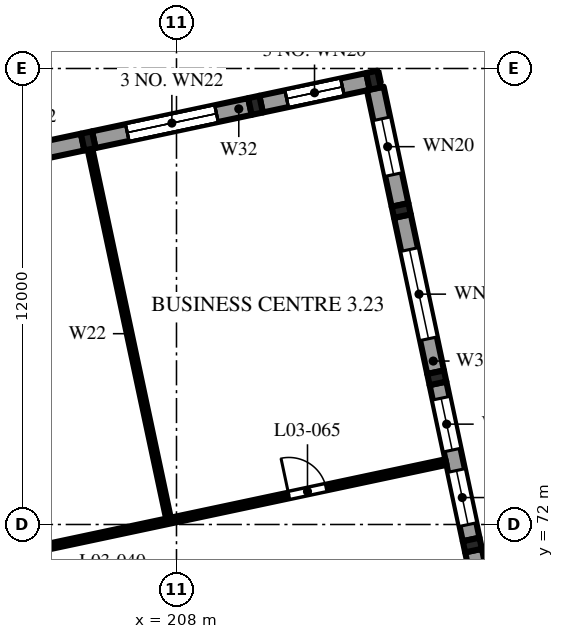
"""IFC4 building model, lengths in metres.
Left out: names, types, materials, properties, quantities, classifications, styles, units other than length and angle.
Written with IfcOpenShell. Run it as: python <this file> out.ifc"""

import sys

from ifc_helpers import new_model, si_unit, direction, frame, frame_2d, origin, origin_2d, place, context, subcontext, project, spatial, polyline, rectangle, i_section, outline, extrude, element, fill, save


model = new_model("IFC4")
c1 = context("Model", 3, precision=1e-05, world=origin(), true_north=direction((0.0, 1.0)))
c2 = subcontext(c1, "Body", "Model", "MODEL_VIEW")
j1 = project(units=[si_unit("LENGTHUNIT", "METRE"), si_unit("PLANEANGLEUNIT", "RADIAN")], contexts=[c1])
p1 = place(None, origin())
s1 = spatial("IfcSite", under=j1, at=p1, CompositionType="ELEMENT")
p2 = place(p1, origin())
s2 = spatial("IfcBuilding", under=s1, at=p2, CompositionType="ELEMENT")
p3 = place(p2, frame((0.0, 0.0, 16.8)))
s3 = spatial("IfcBuildingStorey", under=s2, at=p3, CompositionType="ELEMENT", Elevation=16.8)
for number, where, z_axis, x_axis in (
    (1, (205.678, 82.095, 0.0), (0.0, 0.0, 1.0), (0.978, 0.208, 0.0)),
    (2, (210.079, 83.031, 0.0), (0.0, 0.0, 1.0), (0.978, 0.208, 0.0)),
    (3, (213.185, 83.691, 0.0), (0.0, 0.0, 1.0), (0.978, 0.208, 0.0)),
    (4, (215.785, 71.459, 0.0), (0.0, 0.0, 1.0), (-0.208, 0.978, 0.0)),
    (5, (214.849, 75.861, 0.0), (0.0, 0.0, 1.0), (-0.208, 0.978, 0.0)),
    (6, (213.914, 80.263, 0.0), (0.0, 0.0, 1.0), (-0.208, 0.978, 0.0)),
):
    element("IfcColumn", number, at=place(p3, frame(where, z_axis=z_axis, x_axis=x_axis)), inside=s3, PredefinedType="COLUMN", context=c2, shape_type="SweptSolid", body=[
        extrude(i_section(OverallWidth=0.3, OverallDepth=0.45, WebThickness=0.014, FlangeThickness=0.026, FilletRadius=0.027, at=origin_2d()), origin(), (0.0, 0.0, 1.0), 4.8),
    ])
p4 = place(p3, frame((201.423, 81.191, 0.0), z_axis=(0.0, 0.0, 1.0), x_axis=(0.978155748334, 0.207873355681, 0.0)))
e7 = element("IfcWall", 7, at=p4, inside=s3, PredefinedType="SOLIDWALL", context=c2, shape_type="SweptSolid", body=[
    extrude(outline(polyline([(0.0, 0.0), (4.2, 0.0), (4.2, 15.04), (0.0, 14.816), (0.0, 0.0)])), frame((0.0, 0.225, 0.0), z_axis=(0.0, -1.0, 0.0), x_axis=(1.0, 0.0, 0.0)), (0.0, 0.0, 1.0), 0.45),
])
p5 = place(p4, frame((0.9, 0.0, 0.9)))
e8 = element("IfcOpeningElement", 8, at=p5, cuts=e7, PredefinedType="OPENING", context=c2, shape_type="SweptSolid", body=[
    extrude(rectangle(XDim=2.4, YDim=2.4, at=frame_2d((1.2, 1.2))), frame((0.0, 0.235, 0.0), z_axis=(0.0, -1.0, 0.0), x_axis=(1.0, 0.0, 0.0)), (0.0, 0.0, 1.0), 0.47),
])
p6 = place(p4, frame((0.9, 0.0, 5.1)))
e9 = element("IfcOpeningElement", 9, at=p6, cuts=e7, PredefinedType="OPENING", context=c2, shape_type="SweptSolid", body=[
    extrude(rectangle(XDim=2.4, YDim=2.4, at=frame_2d((1.2, 1.2))), frame((0.0, 0.235, 0.0), z_axis=(0.0, -1.0, 0.0), x_axis=(1.0, 0.0, 0.0)), (0.0, 0.0, 1.0), 0.47),
])
p7 = place(p4, frame((0.9, 0.0, 9.3)))
e10 = element("IfcOpeningElement", 10, at=p7, cuts=e7, PredefinedType="OPENING", context=c2, shape_type="SweptSolid", body=[
    extrude(rectangle(XDim=2.4, YDim=2.4, at=frame_2d((1.2, 1.2))), frame((0.0, 0.235, 0.0), z_axis=(0.0, -1.0, 0.0), x_axis=(1.0, 0.0, 0.0)), (0.0, 0.0, 1.0), 0.47),
])
p8 = place(p3, frame((205.824, 82.126, 0.0), z_axis=(0.0, 0.0, 1.0), x_axis=(0.978143927149, 0.207928972925, 0.0)))
e11 = element("IfcWall", 11, at=p8, inside=s3, PredefinedType="SOLIDWALL", context=c2, shape_type="SweptSolid", body=[
    extrude(outline(polyline([(0.0, 0.0), (4.2, 0.0), (4.2, 15.281), (0.0, 15.056), (0.0, 0.0)])), frame((0.0, 0.225, 0.0), z_axis=(0.0, -1.0, 0.0), x_axis=(1.0, 0.0, 0.0)), (0.0, 0.0, 1.0), 0.45),
])
p9 = place(p8, frame((0.9, 0.0, 0.9)))
e12 = element("IfcOpeningElement", 12, at=p9, cuts=e11, PredefinedType="OPENING", context=c2, shape_type="SweptSolid", body=[
    extrude(rectangle(XDim=2.4, YDim=2.4, at=frame_2d((1.2, 1.2))), frame((0.0, 0.235, 0.0), z_axis=(0.0, -1.0, 0.0), x_axis=(1.0, 0.0, 0.0)), (0.0, 0.0, 1.0), 0.47),
])
p10 = place(p8, frame((0.9, 0.0, 5.1)))
e13 = element("IfcOpeningElement", 13, at=p10, cuts=e11, PredefinedType="OPENING", context=c2, shape_type="SweptSolid", body=[
    extrude(rectangle(XDim=2.4, YDim=2.4, at=frame_2d((1.2, 1.2))), frame((0.0, 0.235, 0.0), z_axis=(0.0, -1.0, 0.0), x_axis=(1.0, 0.0, 0.0)), (0.0, 0.0, 1.0), 0.47),
])
p11 = place(p8, frame((0.9, 0.0, 9.3)))
e14 = element("IfcOpeningElement", 14, at=p11, cuts=e11, PredefinedType="OPENING", context=c2, shape_type="SweptSolid", body=[
    extrude(rectangle(XDim=2.4, YDim=2.4, at=frame_2d((1.2, 1.2))), frame((0.0, 0.235, 0.0), z_axis=(0.0, -1.0, 0.0), x_axis=(1.0, 0.0, 0.0)), (0.0, 0.0, 1.0), 0.47),
])
p12 = place(p3, frame((210.226, 83.062, 0.0), z_axis=(0.0, 0.0, 1.0), x_axis=(0.978137912316, 0.207957266018, 0.0)))
e15 = element("IfcWall", 15, at=p12, inside=s3, PredefinedType="SOLIDWALL", context=c2, shape_type="SweptSolid", body=[
    extrude(outline(polyline([(0.0, 0.0), (2.875, 0.0), (2.875, 15.451), (0.0, 15.297), (0.0, 0.0)])), frame((0.0, 0.225, 0.0), z_axis=(0.0, -1.0, 0.0), x_axis=(1.0, 0.0, 0.0)), (0.0, 0.0, 1.0), 0.45),
])
p13 = place(p12, frame((0.688, 0.0, 0.9)))
e16 = element("IfcOpeningElement", 16, at=p13, cuts=e15, PredefinedType="OPENING", context=c2, shape_type="SweptSolid", body=[
    extrude(rectangle(XDim=1.5, YDim=2.4, at=frame_2d((0.75, 1.2))), frame((0.0, 0.235, 0.0), z_axis=(0.0, -1.0, 0.0), x_axis=(1.0, 0.0, 0.0)), (0.0, 0.0, 1.0), 0.47),
])
p14 = place(p12, frame((0.688, 0.0, 5.1)))
e17 = element("IfcOpeningElement", 17, at=p14, cuts=e15, PredefinedType="OPENING", context=c2, shape_type="SweptSolid", body=[
    extrude(rectangle(XDim=1.5, YDim=2.4, at=frame_2d((0.75, 1.2))), frame((0.0, 0.235, 0.0), z_axis=(0.0, -1.0, 0.0), x_axis=(1.0, 0.0, 0.0)), (0.0, 0.0, 1.0), 0.47),
])
p15 = place(p12, frame((0.688, 0.0, 9.3)))
e18 = element("IfcOpeningElement", 18, at=p15, cuts=e15, PredefinedType="OPENING", context=c2, shape_type="SweptSolid", body=[
    extrude(rectangle(XDim=1.5, YDim=2.4, at=frame_2d((0.75, 1.2))), frame((0.0, 0.235, 0.0), z_axis=(0.0, -1.0, 0.0), x_axis=(1.0, 0.0, 0.0)), (0.0, 0.0, 1.0), 0.47),
])
p16 = place(p3, frame((216.689, 67.204, 0.0), z_axis=(0.0, 0.0, 1.0), x_axis=(-0.207873355681, 0.978155748334, 0.0)))
e19 = element("IfcWall", 19, at=p16, inside=s3, PredefinedType="SOLIDWALL", context=c2, shape_type="SweptSolid", body=[
    extrude(outline(polyline([(0.0, 0.0), (4.2, 0.0), (4.2, 16.122), (0.0, 16.342), (0.0, 0.0)])), frame((0.0, 0.225, 0.0), z_axis=(0.0, -1.0, 0.0), x_axis=(1.0, 0.0, 0.0)), (0.0, 0.0, 1.0), 0.45),
])
p17 = place(p16, frame((0.4, 0.0, 0.9)))
e20 = element("IfcOpeningElement", 20, at=p17, cuts=e19, PredefinedType="OPENING", context=c2, shape_type="SweptSolid", body=[
    extrude(rectangle(XDim=2.405, YDim=2.4, at=frame_2d((1.203, 1.2))), frame((0.0, 0.235, 0.0), z_axis=(0.0, -1.0, 0.0), x_axis=(1.0, 0.0, 0.0)), (0.0, 0.0, 1.0), 0.47),
])
p18 = place(p16, frame((3.355, 0.0, 0.9)))
e21 = element("IfcOpeningElement", 21, at=p18, cuts=e19, PredefinedType="OPENING", context=c2, shape_type="SweptSolid", body=[
    extrude(rectangle(XDim=0.445, YDim=2.4, at=frame_2d((0.223, 1.2))), frame((0.0, 0.235, 0.0), z_axis=(0.0, -1.0, 0.0), x_axis=(1.0, 0.0, 0.0)), (0.0, 0.0, 1.0), 0.47),
])
p19 = place(p3, frame((215.754, 71.606, 0.0), z_axis=(0.0, 0.0, 1.0), x_axis=(-0.207873355681, 0.978155748334, 0.0)))
e22 = element("IfcWall", 22, at=p19, inside=s3, PredefinedType="SOLIDWALL", context=c2, shape_type="SweptSolid", body=[
    extrude(outline(polyline([(0.0, 0.0), (4.2, 0.0), (4.2, 15.886), (0.0, 16.106), (0.0, 0.0)])), frame((0.0, 0.225, 0.0), z_axis=(0.0, -1.0, 0.0), x_axis=(1.0, 0.0, 0.0)), (0.0, 0.0, 1.0), 0.45),
])
p20 = place(p19, frame((0.4, 0.0, 0.9)))
e23 = element("IfcOpeningElement", 23, at=p20, cuts=e22, PredefinedType="OPENING", context=c2, shape_type="SweptSolid", body=[
    extrude(rectangle(XDim=1.455, YDim=2.4, at=frame_2d((0.728, 1.2))), frame((0.0, 0.235, 0.0), z_axis=(0.0, -1.0, 0.0), x_axis=(1.0, 0.0, 0.0)), (0.0, 0.0, 1.0), 0.47),
])
p21 = place(p19, frame((2.405, 0.0, 0.9)))
e24 = element("IfcOpeningElement", 24, at=p21, cuts=e22, PredefinedType="OPENING", context=c2, shape_type="SweptSolid", body=[
    extrude(rectangle(XDim=1.395, YDim=2.4, at=frame_2d((0.698, 1.2))), frame((0.0, 0.235, 0.0), z_axis=(0.0, -1.0, 0.0), x_axis=(1.0, 0.0, 0.0)), (0.0, 0.0, 1.0), 0.47),
])
p22 = place(p3, frame((214.818, 76.008, 0.0), z_axis=(0.0, 0.0, 1.0), x_axis=(-0.207917150959, 0.978146440129, 0.0)))
e25 = element("IfcWall", 25, at=p22, inside=s3, PredefinedType="SOLIDWALL", context=c2, shape_type="SweptSolid", body=[
    extrude(outline(polyline([(0.0, 0.0), (4.2, 0.0), (4.2, 15.651), (0.0, 15.871), (0.0, 0.0)])), frame((0.0, 0.225, 0.0), z_axis=(0.0, -1.0, 0.0), x_axis=(1.0, 0.0, 0.0)), (0.0, 0.0, 1.0), 0.45),
])
p23 = place(p22, frame((0.9, 0.0, 0.9)))
e26 = element("IfcOpeningElement", 26, at=p23, cuts=e25, PredefinedType="OPENING", context=c2, shape_type="SweptSolid", body=[
    extrude(rectangle(XDim=2.4, YDim=2.4, at=frame_2d((1.2, 1.2))), frame((0.0, 0.235, 0.0), z_axis=(0.0, -1.0, 0.0), x_axis=(1.0, 0.0, 0.0)), (0.0, 0.0, 1.0), 0.47),
])
p24 = place(p3, frame((213.883, 80.409, 0.0), z_axis=(0.0, 0.0, 1.0), x_axis=(-0.207933268122, 0.978143014087, 0.0)))
e27 = element("IfcWall", 27, at=p24, inside=s3, PredefinedType="SOLIDWALL", context=c2, shape_type="SweptSolid", body=[
    extrude(outline(polyline([(0.0, 0.0), (3.135, 0.0), (3.135, 15.47), (0.0, 15.635), (0.0, 0.0)])), frame((0.0, 0.225, 0.0), z_axis=(0.0, -1.0, 0.0), x_axis=(1.0, 0.0, 0.0)), (0.0, 0.0, 1.0), 0.45),
])
p25 = place(p24, frame((0.817, 0.0, 0.9)))
e28 = element("IfcOpeningElement", 28, at=p25, cuts=e27, PredefinedType="OPENING", context=c2, shape_type="SweptSolid", body=[
    extrude(rectangle(XDim=1.5, YDim=2.4, at=frame_2d((0.75, 1.2))), frame((0.0, 0.235, 0.0), z_axis=(0.0, -1.0, 0.0), x_axis=(1.0, 0.0, 0.0)), (0.0, 0.0, 1.0), 0.47),
])
p26 = place(p3, frame((185.795, 67.416, 0.0), z_axis=(0.0, 0.0, 1.0), x_axis=(0.978148801969, 0.20790603937, 0.0)))
e29 = element("IfcWall", 29, at=p26, inside=s3, PredefinedType="PARTITIONING", context=c2, shape_type="SweptSolid", body=[
    extrude(outline(polyline([(0.0, 0.0), (29.95, 0.0), (29.95, 13.883), (0.0, 12.28), (0.0, 0.0)])), frame((0.0, 0.075, 0.0), z_axis=(0.0, -1.0, 0.0), x_axis=(1.0, 0.0, 0.0)), (0.0, 0.0, 1.0), 0.15),
])
p27 = place(p26, frame((3.6, 0.0, 0.0)))
e30 = element("IfcOpeningElement", 30, at=p27, cuts=e29, PredefinedType="OPENING", context=c2, shape_type="SweptSolid", body=[
    extrude(rectangle(XDim=1.8, YDim=2.1, at=frame_2d((0.9, 1.05))), frame((0.0, 0.085, 0.0), z_axis=(0.0, -1.0, 0.0), x_axis=(1.0, 0.0, 0.0)), (0.0, 0.0, 1.0), 0.17),
])
p28 = place(p26, frame((14.85, 0.0, 0.0)))
e31 = element("IfcOpeningElement", 31, at=p28, cuts=e29, PredefinedType="OPENING", context=c2, shape_type="SweptSolid", body=[
    extrude(rectangle(XDim=1.8, YDim=2.1, at=frame_2d((0.9, 1.05))), frame((0.0, 0.085, 0.0), z_axis=(0.0, -1.0, 0.0), x_axis=(1.0, 0.0, 0.0)), (0.0, 0.0, 1.0), 0.17),
])
p29 = place(p26, frame((25.725, 0.0, 0.0)))
e32 = element("IfcOpeningElement", 32, at=p29, cuts=e29, PredefinedType="OPENING", context=c2, shape_type="SweptSolid", body=[
    extrude(rectangle(XDim=1.0, YDim=2.1, at=frame_2d((0.5, 1.05))), frame((0.0, 0.085, 0.0), z_axis=(0.0, -1.0, 0.0), x_axis=(1.0, 0.0, 0.0)), (0.0, 0.0, 1.0), 0.17),
])
p30 = place(p3, frame((205.724, 81.875, 0.0), z_axis=(0.0, 0.0, 1.0), x_axis=(0.207927890391, -0.978144157268, 0.0)))
e33 = element("IfcWall", 33, at=p30, inside=s3, PredefinedType="PARTITIONING", context=c2, shape_type="SweptSolid", body=[
    extrude(outline(polyline([(0.0, 0.0), (9.925, 0.0), (9.925, 13.256), (0.0, 12.96), (0.0, 0.0)])), frame((0.0, 0.062, 0.0), z_axis=(0.0, -1.0, 0.0), x_axis=(1.0, 0.0, 0.0)), (0.0, 0.0, 1.0), 0.125),
])
p31 = place(p9, origin())
e34 = element("IfcWindow", 34, at=p31, inside=s3, PartitioningType="SINGLE_PANEL", PredefinedType="WINDOW", context=c2, shape_type="SweptSolid", body=[
    extrude(rectangle(XDim=2.4, YDim=2.4, at=frame_2d((1.2, 1.2))), frame((0.0, 0.03, 0.0), z_axis=(0.0, -1.0, 0.0), x_axis=(1.0, 0.0, 0.0)), (0.0, 0.0, 1.0), 0.06),
])
fill(e12, e34)
p32 = place(p10, origin())
e35 = element("IfcWindow", 35, at=p32, inside=s3, PartitioningType="SINGLE_PANEL", PredefinedType="WINDOW", context=c2, shape_type="SweptSolid", body=[
    extrude(rectangle(XDim=2.4, YDim=2.4, at=frame_2d((1.2, 1.2))), frame((0.0, 0.03, 0.0), z_axis=(0.0, -1.0, 0.0), x_axis=(1.0, 0.0, 0.0)), (0.0, 0.0, 1.0), 0.06),
])
fill(e13, e35)
p33 = place(p11, origin())
e36 = element("IfcWindow", 36, at=p33, inside=s3, PartitioningType="SINGLE_PANEL", PredefinedType="WINDOW", context=c2, shape_type="SweptSolid", body=[
    extrude(rectangle(XDim=2.4, YDim=2.4, at=frame_2d((1.2, 1.2))), frame((0.0, 0.03, 0.0), z_axis=(0.0, -1.0, 0.0), x_axis=(1.0, 0.0, 0.0)), (0.0, 0.0, 1.0), 0.06),
])
fill(e14, e36)
p34 = place(p13, origin())
e37 = element("IfcWindow", 37, at=p34, inside=s3, PartitioningType="SINGLE_PANEL", PredefinedType="WINDOW", context=c2, shape_type="SweptSolid", body=[
    extrude(rectangle(XDim=1.5, YDim=2.4, at=frame_2d((0.75, 1.2))), frame((0.0, 0.03, 0.0), z_axis=(0.0, -1.0, 0.0), x_axis=(1.0, 0.0, 0.0)), (0.0, 0.0, 1.0), 0.06),
])
fill(e16, e37)
p35 = place(p14, origin())
e38 = element("IfcWindow", 38, at=p35, inside=s3, PartitioningType="SINGLE_PANEL", PredefinedType="WINDOW", context=c2, shape_type="SweptSolid", body=[
    extrude(rectangle(XDim=1.5, YDim=2.4, at=frame_2d((0.75, 1.2))), frame((0.0, 0.03, 0.0), z_axis=(0.0, -1.0, 0.0), x_axis=(1.0, 0.0, 0.0)), (0.0, 0.0, 1.0), 0.06),
])
fill(e17, e38)
p36 = place(p15, origin())
e39 = element("IfcWindow", 39, at=p36, inside=s3, PartitioningType="SINGLE_PANEL", PredefinedType="WINDOW", context=c2, shape_type="SweptSolid", body=[
    extrude(rectangle(XDim=1.5, YDim=2.4, at=frame_2d((0.75, 1.2))), frame((0.0, 0.03, 0.0), z_axis=(0.0, -1.0, 0.0), x_axis=(1.0, 0.0, 0.0)), (0.0, 0.0, 1.0), 0.06),
])
fill(e18, e39)
p37 = place(p20, origin())
e40 = element("IfcWindow", 40, at=p37, inside=s3, PartitioningType="SINGLE_PANEL", PredefinedType="WINDOW", context=c2, shape_type="SweptSolid", body=[
    extrude(rectangle(XDim=1.455, YDim=2.4, at=frame_2d((0.728, 1.2))), frame((0.0, 0.03, 0.0), z_axis=(0.0, -1.0, 0.0), x_axis=(1.0, 0.0, 0.0)), (0.0, 0.0, 1.0), 0.06),
])
fill(e23, e40)
p38 = place(p21, origin())
e41 = element("IfcWindow", 41, at=p38, inside=s3, PartitioningType="SINGLE_PANEL", PredefinedType="WINDOW", context=c2, shape_type="SweptSolid", body=[
    extrude(rectangle(XDim=1.395, YDim=2.4, at=frame_2d((0.698, 1.2))), frame((0.0, 0.03, 0.0), z_axis=(0.0, -1.0, 0.0), x_axis=(1.0, 0.0, 0.0)), (0.0, 0.0, 1.0), 0.06),
])
fill(e24, e41)
p39 = place(p23, origin())
e42 = element("IfcWindow", 42, at=p39, inside=s3, PartitioningType="SINGLE_PANEL", PredefinedType="WINDOW", context=c2, shape_type="SweptSolid", body=[
    extrude(rectangle(XDim=2.4, YDim=2.4, at=frame_2d((1.2, 1.2))), frame((0.0, 0.03, 0.0), z_axis=(0.0, -1.0, 0.0), x_axis=(1.0, 0.0, 0.0)), (0.0, 0.0, 1.0), 0.06),
])
fill(e26, e42)
p40 = place(p25, origin())
e43 = element("IfcWindow", 43, at=p40, inside=s3, PartitioningType="SINGLE_PANEL", PredefinedType="WINDOW", context=c2, shape_type="SweptSolid", body=[
    extrude(rectangle(XDim=1.5, YDim=2.4, at=frame_2d((0.75, 1.2))), frame((0.0, 0.03, 0.0), z_axis=(0.0, -1.0, 0.0), x_axis=(1.0, 0.0, 0.0)), (0.0, 0.0, 1.0), 0.06),
])
fill(e28, e43)
p41 = place(p29, origin())
e44 = element("IfcDoor", 44, at=p41, inside=s3, OperationType="SINGLE_SWING_RIGHT", PredefinedType="DOOR", context=c2, shape_type="SweptSolid", body=[
    extrude(rectangle(XDim=1.0, YDim=2.1, at=frame_2d((0.5, 1.05))), frame((0.0, 0.025, 0.0), z_axis=(0.0, -1.0, 0.0), x_axis=(1.0, 0.0, 0.0)), (0.0, 0.0, 1.0), 0.05),
])
fill(e32, e44)
save(model, sys.argv[1])
